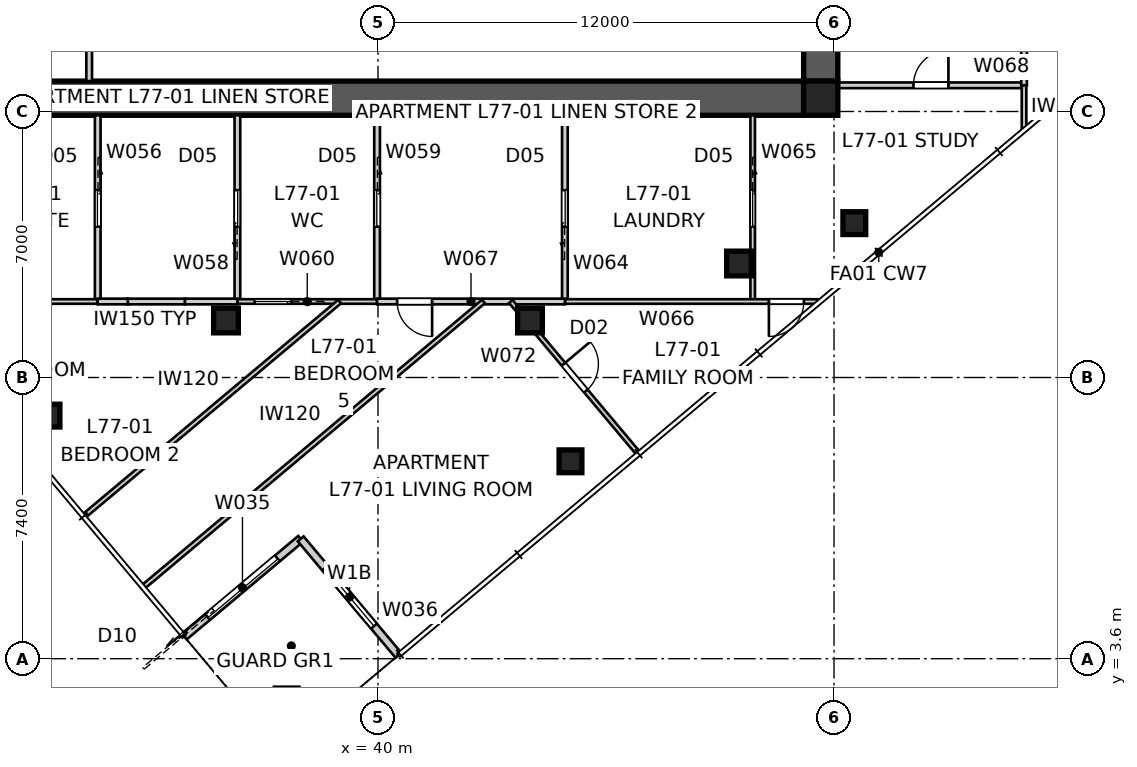
"""IFC4 building model, lengths in metres.
Left out: names, types, materials, properties, quantities, classifications, styles, units other than length and angle.
Written with IfcOpenShell. Run it as: python <this file> out.ifc"""

import sys

from ifc_helpers import new_model, si_unit, direction, frame, frame_2d, origin, origin_2d, place, context, subcontext, project, spatial, polyline, rectangle, outline, extrude, element, fill, save


model = new_model("IFC4")
c1 = context("Model", 3, precision=1e-05, world=origin(), true_north=direction((0.0, 1.0)))
c2 = subcontext(c1, "Body", "Model", "MODEL_VIEW")
j1 = project(units=[si_unit("LENGTHUNIT", "METRE"), si_unit("PLANEANGLEUNIT", "RADIAN")], contexts=[c1])
p1 = place(None, origin())
s1 = spatial("IfcSite", under=j1, at=p1, CompositionType="ELEMENT")
p2 = place(p1, origin())
s2 = spatial("IfcBuilding", under=s1, at=p2, CompositionType="ELEMENT")
p3 = place(p2, frame((0.0, 0.0, 279.4)))
s3 = spatial("IfcBuildingStorey", under=s2, at=p3, CompositionType="ELEMENT", Elevation=279.4)
p4 = place(p3, frame((51.2, 18.35, 0.0), z_axis=(0.0, 0.0, 1.0), x_axis=(-1.0, 0.0, 0.0)))
e1 = element("IfcWall", 1, at=p4, inside=s3, PredefinedType="SHEAR", context=c2, shape_type="SweptSolid", body=[
    extrude(outline(polyline([(0.0, -0.45), (22.4, -0.45), (22.4, -0.025), (22.85, -0.025), (22.85, 0.025), (22.4, 0.025), (22.4, 0.45), (0.0, 0.45), (0.0, 0.025), (-0.45, 0.025), (-0.45, -0.025), (0.0, -0.025), (0.0, -0.45)])), origin(), (0.0, 0.0, 1.0), 3.4),
])
p5 = place(p3, frame((51.65, 18.8, 0.0), z_axis=(0.0, 0.0, 1.0), x_axis=(0.0, 1.0, 0.0)))
e2 = element("IfcWall", 2, at=p5, inside=s3, PredefinedType="SHEAR", context=c2, shape_type="SweptSolid", body=[
    extrude(outline(polyline([(0.0, -0.45), (22.4, -0.45), (22.4, -0.025), (22.85, -0.025), (22.85, 0.025), (22.4, 0.025), (22.4, 0.45), (0.0, 0.45), (0.0, 0.025), (-0.45, 0.025), (-0.45, -0.025), (0.0, -0.025), (0.0, -0.45)])), origin(), (0.0, 0.0, 1.0), 3.4),
])
p6 = place(p5, frame((11.14, 0.0, 0.0)))
e3 = element("IfcOpeningElement", 3, at=p6, cuts=e2, PredefinedType="OPENING", context=c2, shape_type="SweptSolid", body=[
    extrude(rectangle(XDim=1.02, YDim=2.4, at=frame_2d((0.51, 1.2))), frame((0.0, 0.46, 0.0), z_axis=(0.0, -1.0, 0.0), x_axis=(1.0, 0.0, 0.0)), (0.0, 0.0, 1.0), 0.92),
])
p7 = place(p3, frame((51.65, 18.35, 0.0), z_axis=(0.0, 0.0, 1.0), x_axis=(1.0, 0.0, 0.0)))
e4 = element("IfcColumn", 4, at=p7, inside=s3, PredefinedType="COLUMN", context=c2, shape_type="SweptSolid", body=[
    extrude(rectangle(XDim=0.9, YDim=0.9, at=origin_2d()), origin(), (0.0, 0.0, 1.0), 3.4),
])
for number, where, z_axis, x_axis in (
    (5, (45.065, 8.795, 0.0), (0.0, 0.0, 1.0), (1.0, 0.0, 0.0)),
    (6, (52.534, 15.062, 0.0), (0.0, 0.0, 1.0), (1.0, 0.0, 0.0)),
    (7, (31.329, 9.997, 0.0), (0.0, 0.0, 1.0), (1.0, 0.0, 0.0)),
):
    element("IfcColumn", number, at=place(p3, frame(where, z_axis=z_axis, x_axis=x_axis)), inside=s3, PredefinedType="COLUMN", context=c2, shape_type="SweptSolid", body=[
        extrude(rectangle(XDim=0.6, YDim=0.6, at=origin_2d()), origin(), (0.0, 0.0, 1.0), 3.4),
    ])
for number, where, z_axis, x_axis in (
    (8, (36.0, 12.5, 0.0), (0.0, 0.0, 1.0), (1.0, 0.0, 0.0)),
    (9, (44.0, 12.5, 0.0), (0.0, 0.0, 1.0), (1.0, 0.0, 0.0)),
    (10, (49.5, 14.0, 0.0), (0.0, 0.0, 1.0), (1.0, 0.0, 0.0)),
):
    element("IfcColumn", number, at=place(p3, frame(where, z_axis=z_axis, x_axis=x_axis)), inside=s3, PredefinedType="COLUMN", context=c2, shape_type="SweptSolid", body=[
        extrude(rectangle(XDim=0.65, YDim=0.65, at=origin_2d()), origin(), (0.0, 0.0, 1.0), 3.4),
    ])
p8 = place(p3, frame((34.902, 4.183, 0.0), z_axis=(0.0, 0.0, 1.0), x_axis=(0.766060656284, 0.642768287094, 0.0)))
e11 = element("IfcWall", 11, at=p8, inside=s3, PredefinedType="SOLIDWALL", context=c2, shape_type="SweptSolid", body=[
    extrude(rectangle(XDim=4.0, YDim=0.2, at=frame_2d((2.0, 0.0))), origin(), (0.0, 0.0, 1.0), 3.25),
])
p9 = place(p8, frame((0.8, 0.0, 0.0)))
e12 = element("IfcOpeningElement", 12, at=p9, cuts=e11, PredefinedType="OPENING", context=c2, shape_type="SweptSolid", body=[
    extrude(rectangle(XDim=2.4, YDim=2.4, at=frame_2d((1.2, 1.2))), frame((0.0, 0.11, 0.0), z_axis=(0.0, -1.0, 0.0), x_axis=(1.0, 0.0, 0.0)), (0.0, 0.0, 1.0), 0.22),
])
p10 = place(p3, frame((37.966, 6.754, 0.0), z_axis=(0.0, 0.0, 1.0), x_axis=(0.642798342015, -0.766035437498, 0.0)))
e13 = element("IfcWall", 13, at=p10, inside=s3, PredefinedType="SOLIDWALL", context=c2, shape_type="SweptSolid", body=[
    extrude(rectangle(XDim=4.0, YDim=0.2, at=frame_2d((2.0, 0.0))), origin(), (0.0, 0.0, 1.0), 3.25),
])
p11 = place(p10, frame((1.0, 0.0, 0.45)))
e14 = element("IfcOpeningElement", 14, at=p11, cuts=e13, PredefinedType="OPENING", context=c2, shape_type="SweptSolid", body=[
    extrude(rectangle(XDim=2.0, YDim=1.8, at=frame_2d((1.0, 0.9))), frame((0.0, 0.11, 0.0), z_axis=(0.0, -1.0, 0.0), x_axis=(1.0, 0.0, 0.0)), (0.0, 0.0, 1.0), 0.22),
])
p12 = place(p3, frame((32.4, 18.8, 0.0), z_axis=(0.0, 0.0, 1.0), x_axis=(0.0, 1.0, 0.0)))
e15 = element("IfcWall", 15, at=p12, inside=s3, PredefinedType="SOLIDWALL", context=c2, shape_type="SweptSolid", body=[
    extrude(rectangle(XDim=5.9, YDim=0.15, at=frame_2d((2.95, 0.0))), origin(), (0.0, 0.0, 1.0), 3.25),
])
p13 = place(p3, frame((32.625, 17.9, 0.0), z_axis=(0.0, 0.0, 1.0), x_axis=(0.0, -1.0, 0.0)))
e16 = element("IfcWall", 16, at=p13, inside=s3, PredefinedType="SOLIDWALL", context=c2, shape_type="SweptSolid", body=[
    extrude(rectangle(XDim=4.9, YDim=0.15, at=frame_2d((2.45, 0.0))), origin(), (0.0, 0.0, 1.0), 3.25),
])
p14 = place(p13, frame((1.97, 0.0, 0.0)))
e17 = element("IfcOpeningElement", 17, at=p14, cuts=e16, PredefinedType="OPENING", context=c2, shape_type="SweptSolid", body=[
    extrude(rectangle(XDim=0.96, YDim=2.1, at=frame_2d((0.48, 1.05))), frame((0.0, 0.085, 0.0), z_axis=(0.0, -1.0, 0.0), x_axis=(1.0, 0.0, 0.0)), (0.0, 0.0, 1.0), 0.17),
])
p15 = place(p3, frame((32.625, 13.0, 0.0), z_axis=(0.0, 0.0, 1.0), x_axis=(-1.0, 0.0, 0.0)))
e18 = element("IfcWall", 18, at=p15, inside=s3, PredefinedType="PARTITIONING", context=c2, shape_type="SweptSolid", body=[
    extrude(rectangle(XDim=5.069, YDim=0.12, at=frame_2d((2.534, 0.0))), origin(), (0.0, 0.0, 1.0), 3.25),
])
p16 = place(p3, frame((36.301, 13.0, 0.0), z_axis=(0.0, 0.0, 1.0), x_axis=(0.0, 1.0, 0.0)))
e19 = element("IfcWall", 19, at=p16, inside=s3, PredefinedType="SOLIDWALL", context=c2, shape_type="SweptSolid", body=[
    extrude(rectangle(XDim=4.9, YDim=0.15, at=frame_2d((2.45, 0.0))), origin(), (0.0, 0.0, 1.0), 3.25),
])
p17 = place(p16, frame((1.97, 0.0, 0.0)))
e20 = element("IfcOpeningElement", 20, at=p17, cuts=e19, PredefinedType="OPENING", context=c2, shape_type="SweptSolid", body=[
    extrude(rectangle(XDim=0.96, YDim=2.1, at=frame_2d((0.48, 1.05))), frame((0.0, 0.085, 0.0), z_axis=(0.0, -1.0, 0.0), x_axis=(1.0, 0.0, 0.0)), (0.0, 0.0, 1.0), 0.17),
])
p18 = place(p3, frame((39.976, 17.9, 0.0), z_axis=(0.0, 0.0, 1.0), x_axis=(0.0, -1.0, 0.0)))
e21 = element("IfcWall", 21, at=p18, inside=s3, PredefinedType="SOLIDWALL", context=c2, shape_type="SweptSolid", body=[
    extrude(rectangle(XDim=4.9, YDim=0.15, at=frame_2d((2.45, 0.0))), origin(), (0.0, 0.0, 1.0), 2.796),
])
p19 = place(p18, frame((1.97, 0.0, 0.0)))
e22 = element("IfcOpeningElement", 22, at=p19, cuts=e21, PredefinedType="OPENING", context=c2, shape_type="SweptSolid", body=[
    extrude(rectangle(XDim=0.96, YDim=2.1, at=frame_2d((0.48, 1.05))), frame((0.0, 0.085, 0.0), z_axis=(0.0, -1.0, 0.0), x_axis=(1.0, 0.0, 0.0)), (0.0, 0.0, 1.0), 0.17),
])
p20 = place(p3, frame((39.976, 13.0, 0.0), z_axis=(0.0, 0.0, 1.0), x_axis=(-1.0, 0.0, 0.0)))
e23 = element("IfcWall", 23, at=p20, inside=s3, PredefinedType="PARTITIONING", context=c2, shape_type="SweptSolid", body=[
    extrude(rectangle(XDim=3.676, YDim=0.12, at=frame_2d((1.838, 0.0))), origin(), (0.0, 0.0, 1.0), 3.25),
])
p21 = place(p20, frame((2.261, 0.0, 0.0)))
e24 = element("IfcOpeningElement", 24, at=p21, cuts=e23, PredefinedType="OPENING", context=c2, shape_type="SweptSolid", body=[
    extrude(rectangle(XDim=0.96, YDim=2.1, at=frame_2d((0.48, 1.05))), frame((0.0, 0.07, 0.0), z_axis=(0.0, -1.0, 0.0), x_axis=(1.0, 0.0, 0.0)), (0.0, 0.0, 1.0), 0.14),
])
p22 = place(p3, frame((36.301, 13.0, 0.0), z_axis=(0.0, 0.0, 1.0), x_axis=(-1.0, 0.0, 0.0)))
e25 = element("IfcWall", 25, at=p22, inside=s3, PredefinedType="SOLIDWALL", context=c2, shape_type="SweptSolid", body=[
    extrude(rectangle(XDim=1.384, YDim=0.15, at=frame_2d((0.692, 0.0))), origin(), (0.0, 0.0, 1.0), 3.25),
])
p23 = place(p3, frame((34.917, 13.0, 0.0), z_axis=(0.0, 0.0, 1.0), x_axis=(-1.0, 0.0, 0.0)))
e26 = element("IfcWall", 26, at=p23, inside=s3, PredefinedType="SOLIDWALL", context=c2, shape_type="SweptSolid", body=[
    extrude(rectangle(XDim=1.5, YDim=0.15, at=frame_2d((0.75, 0.0))), origin(), (0.0, 0.0, 1.0), 2.55),
])
p24 = place(p3, frame((33.417, 13.0, 0.0), z_axis=(0.0, 0.0, 1.0), x_axis=(-1.0, 0.0, 0.0)))
e27 = element("IfcWall", 27, at=p24, inside=s3, PredefinedType="SOLIDWALL", context=c2, shape_type="SweptSolid", body=[
    extrude(rectangle(XDim=0.792, YDim=0.15, at=frame_2d((0.396, 0.0))), origin(), (0.0, 0.0, 1.0), 3.25),
])
p25 = place(p3, frame((44.918, 13.0, 0.0), z_axis=(0.0, 0.0, 1.0), x_axis=(0.0, 1.0, 0.0)))
e28 = element("IfcWall", 28, at=p25, inside=s3, PredefinedType="SOLIDWALL", context=c2, shape_type="SweptSolid", body=[
    extrude(rectangle(XDim=4.9, YDim=0.15, at=frame_2d((2.45, 0.0))), origin(), (0.0, 0.0, 1.0), 3.25),
])
p26 = place(p25, frame((1.97, 0.0, 0.0)))
e29 = element("IfcOpeningElement", 29, at=p26, cuts=e28, PredefinedType="OPENING", context=c2, shape_type="SweptSolid", body=[
    extrude(rectangle(XDim=0.96, YDim=2.1, at=frame_2d((0.48, 1.05))), frame((0.0, 0.085, 0.0), z_axis=(0.0, -1.0, 0.0), x_axis=(1.0, 0.0, 0.0)), (0.0, 0.0, 1.0), 0.17),
])
p27 = place(p3, frame((49.86, 17.9, 0.0), z_axis=(0.0, 0.0, 1.0), x_axis=(0.0, -1.0, 0.0)))
e30 = element("IfcWall", 30, at=p27, inside=s3, PredefinedType="PARTITIONING", context=c2, shape_type="SweptSolid", body=[
    extrude(rectangle(XDim=4.9, YDim=0.12, at=frame_2d((2.45, 0.0))), origin(), (0.0, 0.0, 1.0), 3.25),
])
p28 = place(p27, frame((1.97, 0.0, 0.0)))
e31 = element("IfcOpeningElement", 31, at=p28, cuts=e30, PredefinedType="OPENING", context=c2, shape_type="SweptSolid", body=[
    extrude(rectangle(XDim=0.96, YDim=2.1, at=frame_2d((0.48, 1.05))), frame((0.0, 0.07, 0.0), z_axis=(0.0, -1.0, 0.0), x_axis=(1.0, 0.0, 0.0)), (0.0, 0.0, 1.0), 0.14),
])
p29 = place(p3, frame((51.57, 13.0, 0.0), z_axis=(0.0, 0.0, 1.0), x_axis=(-1.0, 0.0, 0.0)))
e32 = element("IfcWall", 32, at=p29, inside=s3, PredefinedType="PARTITIONING", context=c2, shape_type="SweptSolid", body=[
    extrude(rectangle(XDim=6.652, YDim=0.12, at=frame_2d((3.326, 0.0))), origin(), (0.0, 0.0, 1.0), 2.55),
])
p30 = place(p29, frame((0.364, 0.0, 0.0)))
e33 = element("IfcOpeningElement", 33, at=p30, cuts=e32, PredefinedType="OPENING", context=c2, shape_type="SweptSolid", body=[
    extrude(rectangle(XDim=0.92, YDim=2.34, at=frame_2d((0.46, 1.17))), frame((0.0, 0.07, 0.0), z_axis=(0.0, -1.0, 0.0), x_axis=(1.0, 0.0, 0.0)), (0.0, 0.0, 1.0), 0.14),
])
p31 = place(p3, frame((44.918, 13.0, 0.0), z_axis=(0.0, 0.0, 1.0), x_axis=(-1.0, 0.0, 0.0)))
e34 = element("IfcWall", 34, at=p31, inside=s3, PredefinedType="SOLIDWALL", context=c2, shape_type="SweptSolid", body=[
    extrude(rectangle(XDim=4.942, YDim=0.15, at=frame_2d((2.471, 0.0))), origin(), (0.0, 0.0, 1.0), 3.25),
])
p32 = place(p31, frame((3.494, 0.0, 0.0)))
e35 = element("IfcOpeningElement", 35, at=p32, cuts=e34, PredefinedType="OPENING", context=c2, shape_type="SweptSolid", body=[
    extrude(rectangle(XDim=0.92, YDim=2.34, at=frame_2d((0.46, 1.17))), frame((0.0, 0.085, 0.0), z_axis=(0.0, -1.0, 0.0), x_axis=(1.0, 0.0, 0.0)), (0.0, 0.0, 1.0), 0.17),
])
p33 = place(p3, frame((51.18, 18.689, 0.0), z_axis=(0.0, 0.0, 1.0), x_axis=(1.0, 0.0, 0.0)))
e36 = element("IfcWall", 36, at=p33, inside=s3, PredefinedType="SOLIDWALL", context=c2, shape_type="SweptSolid", body=[
    extrude(rectangle(XDim=5.82, YDim=0.15, at=frame_2d((2.91, 0.0))), origin(), (0.0, 0.0, 1.0), 3.25),
])
p34 = place(p33, frame((2.91, 0.0, 0.0)))
e37 = element("IfcOpeningElement", 37, at=p34, cuts=e36, PredefinedType="OPENING", context=c2, shape_type="SweptSolid", body=[
    extrude(rectangle(XDim=0.92, YDim=2.1, at=frame_2d((0.46, 1.05))), frame((0.0, 0.085, 0.0), z_axis=(0.0, -1.0, 0.0), x_axis=(1.0, 0.0, 0.0)), (0.0, 0.0, 1.0), 0.17),
])
p35 = place(p3, frame((57.0, 18.689, 0.0), z_axis=(0.0, 0.0, 1.0), x_axis=(0.0, -1.0, 0.0)))
e38 = element("IfcWall", 38, at=p35, inside=s3, PredefinedType="PARTITIONING", context=c2, shape_type="SweptSolid", body=[
    extrude(rectangle(XDim=1.133, YDim=0.12, at=frame_2d((0.567, 0.0))), origin(), (0.0, 0.0, 1.0), 3.25),
])
p36 = place(p3, frame((57.0, 23.81, 0.0), z_axis=(0.0, 0.0, 1.0), x_axis=(0.0, -1.0, 0.0)))
e39 = element("IfcWall", 39, at=p36, inside=s3, PredefinedType="SOLIDWALL", context=c2, shape_type="SweptSolid", body=[
    extrude(rectangle(XDim=5.121, YDim=0.15, at=frame_2d((2.56, 0.0))), origin(), (0.0, 0.0, 1.0), 3.25),
])
p37 = place(p3, frame((33.844, 5.506, 0.0), z_axis=(0.0, 0.0, 1.0), x_axis=(0.766038517939, 0.642794670975, 0.0)))
e40 = element("IfcWall", 40, at=p37, inside=s3, PredefinedType="PARTITIONING", context=c2, shape_type="SweptSolid", body=[
    extrude(rectangle(XDim=11.658, YDim=0.12, at=frame_2d((5.829, 0.0))), origin(), (0.0, 0.0, 1.0), 3.25),
])
p38 = place(p3, frame((43.495, 13.0, 0.0), z_axis=(0.0, 0.0, 1.0), x_axis=(0.642776136034, -0.76605407051, 0.0)))
e41 = element("IfcWall", 41, at=p38, inside=s3, PredefinedType="PARTITIONING", context=c2, shape_type="SweptSolid", body=[
    extrude(rectangle(XDim=5.191, YDim=0.12, at=frame_2d((2.595, 0.0))), origin(), (0.0, 0.0, 1.0), 3.25),
])
p39 = place(p38, frame((2.155, 0.0, 0.0)))
e42 = element("IfcOpeningElement", 42, at=p39, cuts=e41, PredefinedType="OPENING", context=c2, shape_type="SweptSolid", body=[
    extrude(rectangle(XDim=0.92, YDim=2.34, at=frame_2d((0.46, 1.17))), frame((0.0, 0.07, 0.0), z_axis=(0.0, -1.0, 0.0), x_axis=(1.0, 0.0, 0.0)), (0.0, 0.0, 1.0), 0.14),
])
p40 = place(p3, frame((38.992, 13.0, 0.0), z_axis=(0.0, 0.0, 1.0), x_axis=(-0.766046785022, -0.642784818704, 0.0)))
e43 = element("IfcWall", 43, at=p40, inside=s3, PredefinedType="PARTITIONING", context=c2, shape_type="SweptSolid", body=[
    extrude(rectangle(XDim=8.76, YDim=0.12, at=frame_2d((4.38, 0.0))), origin(), (0.0, 0.0, 1.0), 3.25),
])
p41 = place(p9, origin())
e44 = element("IfcDoor", 44, at=p41, inside=s3, OperationType="SLIDING_TO_LEFT", PredefinedType="DOOR", context=c2, shape_type="SweptSolid", body=[
    extrude(rectangle(XDim=2.4, YDim=2.4, at=frame_2d((1.2, 1.2))), frame((0.0, 0.025, 0.0), z_axis=(0.0, -1.0, 0.0), x_axis=(1.0, 0.0, 0.0)), (0.0, 0.0, 1.0), 0.05),
])
fill(e12, e44)
p42 = place(p11, origin())
e45 = element("IfcWindow", 45, at=p42, inside=s3, PartitioningType="SINGLE_PANEL", PredefinedType="WINDOW", context=c2, shape_type="SweptSolid", body=[
    extrude(rectangle(XDim=2.0, YDim=1.8, at=frame_2d((1.0, 0.9))), frame((0.0, 0.03, 0.0), z_axis=(0.0, -1.0, 0.0), x_axis=(1.0, 0.0, 0.0)), (0.0, 0.0, 1.0), 0.06),
])
fill(e14, e45)
p43 = place(p34, origin())
e46 = element("IfcDoor", 46, at=p43, inside=s3, OperationType="SINGLE_SWING_RIGHT", PredefinedType="DOOR", context=c2, shape_type="SweptSolid", body=[
    extrude(rectangle(XDim=0.92, YDim=2.1, at=frame_2d((0.46, 1.05))), frame((0.0, 0.025, 0.0), z_axis=(0.0, -1.0, 0.0), x_axis=(1.0, 0.0, 0.0)), (0.0, 0.0, 1.0), 0.05),
])
fill(e37, e46)
p44 = place(p28, origin())
e47 = element("IfcDoor", 47, at=p44, inside=s3, OperationType="SLIDING_TO_LEFT", PredefinedType="DOOR", context=c2, shape_type="SweptSolid", body=[
    extrude(rectangle(XDim=0.96, YDim=2.1, at=frame_2d((0.48, 1.05))), frame((0.0, 0.025, 0.0), z_axis=(0.0, -1.0, 0.0), x_axis=(1.0, 0.0, 0.0)), (0.0, 0.0, 1.0), 0.05),
])
fill(e31, e47)
p45 = place(p30, origin())
e48 = element("IfcDoor", 48, at=p45, inside=s3, OperationType="SINGLE_SWING_RIGHT", PredefinedType="DOOR", context=c2, shape_type="SweptSolid", body=[
    extrude(rectangle(XDim=0.92, YDim=2.34, at=frame_2d((0.46, 1.17))), frame((0.0, 0.025, 0.0), z_axis=(0.0, -1.0, 0.0), x_axis=(1.0, 0.0, 0.0)), (0.0, 0.0, 1.0), 0.05),
])
fill(e33, e48)
p46 = place(p26, origin())
e49 = element("IfcDoor", 49, at=p46, inside=s3, OperationType="SLIDING_TO_LEFT", PredefinedType="DOOR", context=c2, shape_type="SweptSolid", body=[
    extrude(rectangle(XDim=0.96, YDim=2.1, at=frame_2d((0.48, 1.05))), frame((0.0, 0.025, 0.0), z_axis=(0.0, -1.0, 0.0), x_axis=(1.0, 0.0, 0.0)), (0.0, 0.0, 1.0), 0.05),
])
fill(e29, e49)
p47 = place(p39, origin())
e50 = element("IfcDoor", 50, at=p47, inside=s3, OperationType="SINGLE_SWING_LEFT", PredefinedType="DOOR", context=c2, shape_type="SweptSolid", body=[
    extrude(rectangle(XDim=0.92, YDim=2.34, at=frame_2d((0.46, 1.17))), frame((0.0, 0.025, 0.0), z_axis=(0.0, -1.0, 0.0), x_axis=(1.0, 0.0, 0.0)), (0.0, 0.0, 1.0), 0.05),
])
fill(e42, e50)
p48 = place(p19, origin())
e51 = element("IfcDoor", 51, at=p48, inside=s3, OperationType="SLIDING_TO_LEFT", PredefinedType="DOOR", context=c2, shape_type="SweptSolid", body=[
    extrude(rectangle(XDim=0.96, YDim=2.1, at=frame_2d((0.48, 1.05))), frame((0.0, 0.025, 0.0), z_axis=(0.0, -1.0, 0.0), x_axis=(1.0, 0.0, 0.0)), (0.0, 0.0, 1.0), 0.05),
])
fill(e22, e51)
p49 = place(p32, origin())
e52 = element("IfcDoor", 52, at=p49, inside=s3, OperationType="SINGLE_SWING_LEFT", PredefinedType="DOOR", context=c2, shape_type="SweptSolid", body=[
    extrude(rectangle(XDim=0.92, YDim=2.34, at=frame_2d((0.46, 1.17))), frame((0.0, 0.025, 0.0), z_axis=(0.0, -1.0, 0.0), x_axis=(1.0, 0.0, 0.0)), (0.0, 0.0, 1.0), 0.05),
])
fill(e35, e52)
p50 = place(p17, origin())
e53 = element("IfcDoor", 53, at=p50, inside=s3, OperationType="SLIDING_TO_LEFT", PredefinedType="DOOR", context=c2, shape_type="SweptSolid", body=[
    extrude(rectangle(XDim=0.96, YDim=2.1, at=frame_2d((0.48, 1.05))), frame((0.0, 0.025, 0.0), z_axis=(0.0, -1.0, 0.0), x_axis=(1.0, 0.0, 0.0)), (0.0, 0.0, 1.0), 0.05),
])
fill(e20, e53)
p51 = place(p21, origin())
e54 = element("IfcDoor", 54, at=p51, inside=s3, OperationType="SLIDING_TO_LEFT", PredefinedType="DOOR", context=c2, shape_type="SweptSolid", body=[
    extrude(rectangle(XDim=0.96, YDim=2.1, at=frame_2d((0.48, 1.05))), frame((0.0, 0.025, 0.0), z_axis=(0.0, -1.0, 0.0), x_axis=(1.0, 0.0, 0.0)), (0.0, 0.0, 1.0), 0.05),
])
fill(e24, e54)
p52 = place(p14, origin())
e55 = element("IfcDoor", 55, at=p52, inside=s3, OperationType="SLIDING_TO_LEFT", PredefinedType="DOOR", context=c2, shape_type="SweptSolid", body=[
    extrude(rectangle(XDim=0.96, YDim=2.1, at=frame_2d((0.48, 1.05))), frame((0.0, 0.025, 0.0), z_axis=(0.0, -1.0, 0.0), x_axis=(1.0, 0.0, 0.0)), (0.0, 0.0, 1.0), 0.05),
])
fill(e17, e55)
save(model, sys.argv[1])
